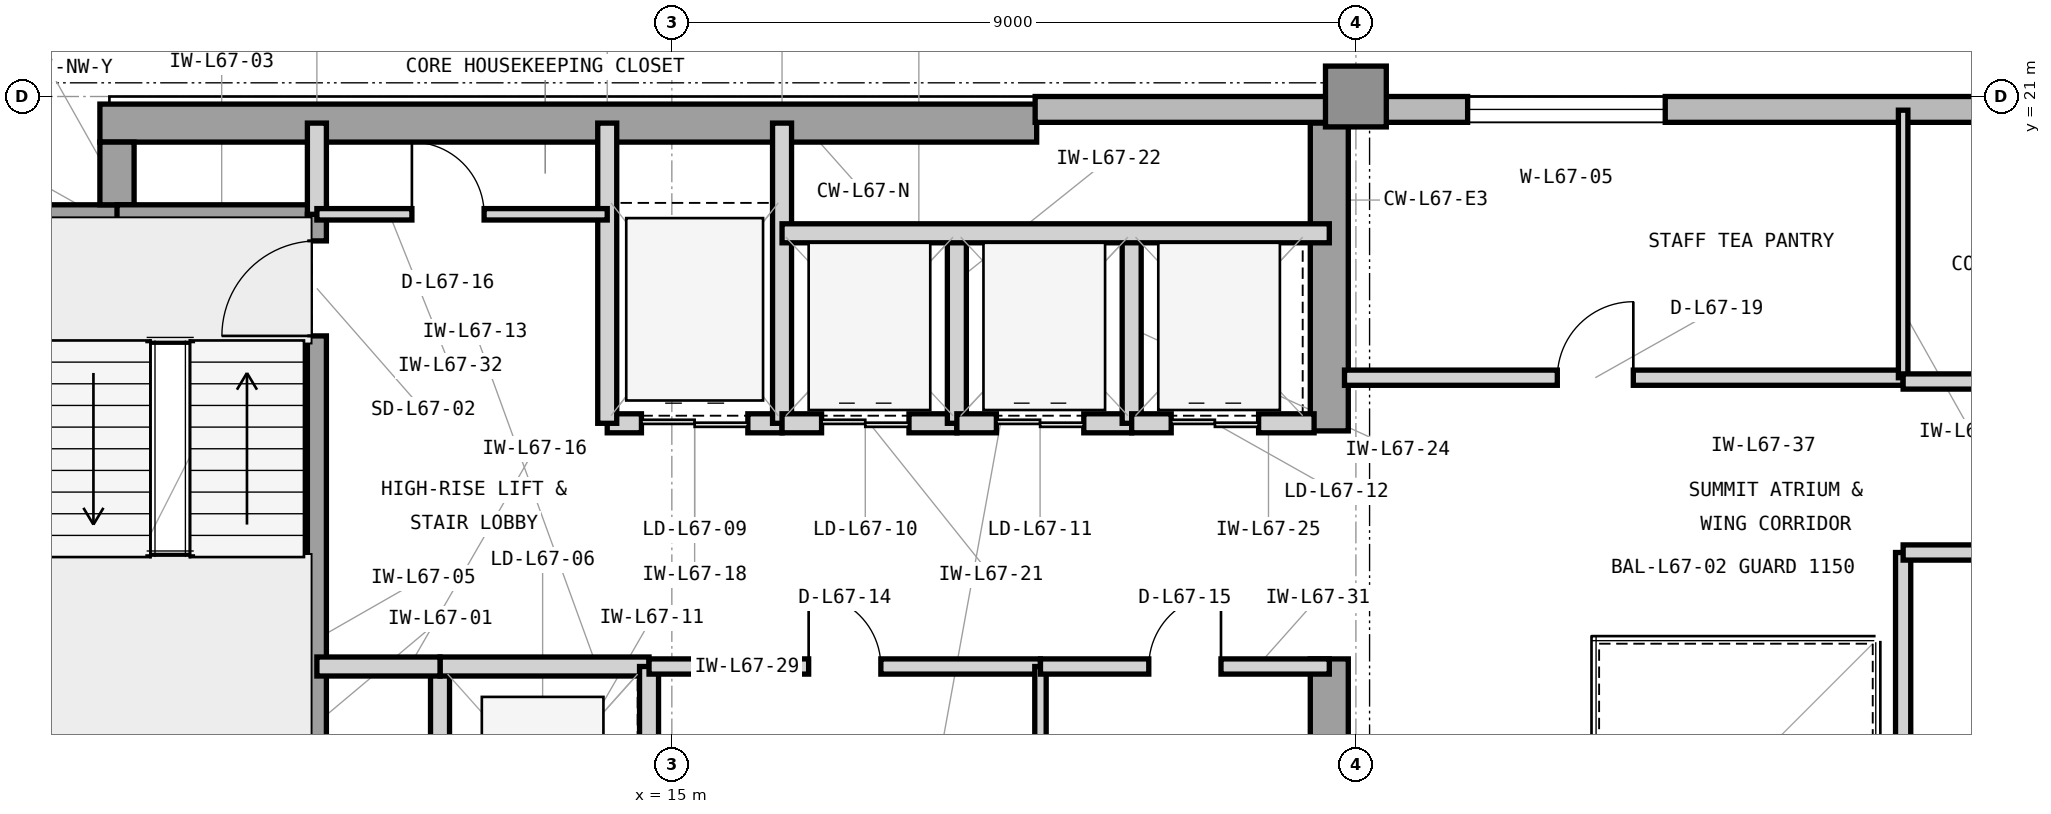
"""IFC4 building model, lengths in metres.
Left out: names, types, materials, properties, quantities, classifications, styles, units other than length and angle.
Written with IfcOpenShell. Run it as: python <this file> out.ifc"""

import sys

from ifc_helpers import new_model, si_unit, direction, frame, frame_2d, origin, origin_2d, place, context, subcontext, project, spatial, rectangle, extrude, element, fill, save


model = new_model("IFC4")
c1 = context("Model", 3, precision=1e-05, world=origin(), true_north=direction((0.0, 1.0)))
c2 = subcontext(c1, "Body", "Model", "MODEL_VIEW")
j1 = project(units=[si_unit("LENGTHUNIT", "METRE"), si_unit("PLANEANGLEUNIT", "RADIAN")], contexts=[c1])
p1 = place(None, origin())
s1 = spatial("IfcSite", under=j1, at=p1, CompositionType="ELEMENT")
p2 = place(p1, origin())
s2 = spatial("IfcBuilding", under=s1, at=p2, CompositionType="ELEMENT")
p3 = place(p2, frame((0.0, 0.0, 274.2)))
s3 = spatial("IfcBuildingStorey", under=s2, at=p3, CompositionType="ELEMENT", Elevation=274.2)
p4 = place(p3, frame((7.475, 20.65, 0.0), z_axis=(0.0, 0.0, 1.0), x_axis=(1.0, 0.0, 0.0)))
e1 = element("IfcWall", 1, at=p4, inside=s3, PredefinedType="SHEAR", context=c2, shape_type="SweptSolid", body=[
    extrude(rectangle(XDim=12.325, YDim=0.5, at=frame_2d((6.163, 0.0))), origin(), (0.0, 0.0, 1.0), 3.9),
])
p5 = place(p3, frame((23.65, 10.4, 0.0), z_axis=(0.0, 0.0, 1.0), x_axis=(0.0, 1.0, 0.0)))
e2 = element("IfcWall", 2, at=p5, inside=s3, PredefinedType="SHEAR", context=c2, shape_type="SweptSolid", body=[
    extrude(rectangle(XDim=3.2, YDim=0.5, at=frame_2d((1.6, 0.0))), origin(), (0.0, 0.0, 1.0), 3.9),
])
p6 = place(p3, frame((23.65, 16.6, 0.0), z_axis=(0.0, 0.0, 1.0), x_axis=(0.0, 1.0, 0.0)))
e3 = element("IfcWall", 3, at=p6, inside=s3, PredefinedType="SHEAR", context=c2, shape_type="SweptSolid", body=[
    extrude(rectangle(XDim=4.05, YDim=0.5, at=frame_2d((2.025, 0.0))), origin(), (0.0, 0.0, 1.0), 3.9),
])
p7 = place(p3, frame((6.6, 19.35, 0.0), z_axis=(0.0, 0.0, 1.0), x_axis=(1.0, 0.0, 0.0)))
e4 = element("IfcWall", 4, at=p7, inside=s3, PredefinedType="SHEAR", context=c2, shape_type="SweptSolid", body=[
    extrude(rectangle(XDim=1.325, YDim=0.45, at=frame_2d((0.663, 0.0))), origin(), (0.0, 0.0, 1.0), 3.9),
])
p8 = place(p3, frame((7.7, 19.575, 0.0), z_axis=(0.0, 0.0, 1.0), x_axis=(0.0, 1.0, 0.0)))
e5 = element("IfcWall", 5, at=p8, inside=s3, PredefinedType="SHEAR", context=c2, shape_type="SweptSolid", body=[
    extrude(rectangle(XDim=0.825, YDim=0.45, at=frame_2d((0.413, 0.0))), origin(), (0.0, 0.0, 1.0), 3.9),
])
p9 = place(p3, frame((24.0, 21.0, 0.0), z_axis=(0.0, 0.0, 1.0), x_axis=(1.0, 0.0, 0.0)))
e6 = element("IfcColumn", 6, at=p9, inside=s3, PredefinedType="COLUMN", context=c2, shape_type="SweptSolid", body=[
    extrude(rectangle(XDim=0.8, YDim=0.8, at=origin_2d()), origin(), (0.0, 0.0, 1.0), 3.9),
])
p10 = place(p3, frame((52.4, 20.83, 0.0), z_axis=(0.0, 0.0, 1.0), x_axis=(-1.0, 0.0, 0.0)))
e7 = element("IfcWall", 7, at=p10, inside=s3, PredefinedType="STANDARD", context=c2, shape_type="SweptSolid", body=[
    extrude(rectangle(XDim=32.62, YDim=0.34, at=frame_2d((16.31, 0.0))), origin(), (0.0, 0.0, 1.0), 3.715),
])
p11 = place(p10, frame((15.01, 0.0, 0.8)))
e8 = element("IfcOpeningElement", 8, at=p11, cuts=e7, PredefinedType="OPENING", context=c2, shape_type="SweptSolid", body=[
    extrude(rectangle(XDim=2.6, YDim=2.35, at=frame_2d((1.3, 1.175))), frame((0.0, 0.18, 0.0), z_axis=(0.0, -1.0, 0.0), x_axis=(1.0, 0.0, 0.0)), (0.0, 0.0, 1.0), 0.36),
])
p12 = place(p10, frame((24.33, 0.0, 0.8)))
e9 = element("IfcOpeningElement", 9, at=p12, cuts=e7, PredefinedType="OPENING", context=c2, shape_type="SweptSolid", body=[
    extrude(rectangle(XDim=2.6, YDim=2.35, at=frame_2d((1.3, 1.175))), frame((0.0, 0.18, 0.0), z_axis=(0.0, -1.0, 0.0), x_axis=(1.0, 0.0, 0.0)), (0.0, 0.0, 1.0), 0.36),
])
p13 = place(p10, frame((7.525, 0.0, 0.8)))
e10 = element("IfcOpeningElement", 10, at=p13, cuts=e7, PredefinedType="OPENING", context=c2, shape_type="SweptSolid", body=[
    extrude(rectangle(XDim=1.9, YDim=2.35, at=frame_2d((0.95, 1.175))), frame((0.0, 0.18, 0.0), z_axis=(0.0, -1.0, 0.0), x_axis=(1.0, 0.0, 0.0)), (0.0, 0.0, 1.0), 0.36),
])
p14 = place(p3, frame((7.7, 19.45, 0.0), z_axis=(0.0, 0.0, 1.0), x_axis=(1.0, 0.0, 0.0)))
e11 = element("IfcWall", 11, at=p14, inside=s3, PredefinedType="SHEAR", context=c2, shape_type="SweptSolid", body=[
    extrude(rectangle(XDim=2.755, YDim=0.25, at=frame_2d((1.377, 0.0))), origin(), (0.0, 0.0, 1.0), 3.9),
])
p15 = place(p3, frame((10.33, 12.0, 0.0), z_axis=(0.0, 0.0, 1.0), x_axis=(0.0, 1.0, 0.0)))
e12 = element("IfcWall", 12, at=p15, inside=s3, PredefinedType="SHEAR", context=c2, shape_type="SweptSolid", body=[
    extrude(rectangle(XDim=7.45, YDim=0.25, at=frame_2d((3.725, 0.0))), origin(), (0.0, 0.0, 1.0), 3.9),
])
p16 = place(p15, frame((5.85, 0.0, 0.0)))
e13 = element("IfcOpeningElement", 13, at=p16, cuts=e12, PredefinedType="OPENING", context=c2, shape_type="SweptSolid", body=[
    extrude(rectangle(XDim=1.25, YDim=2.2, at=frame_2d((0.625, 1.1))), frame((0.0, 0.135, 0.0), z_axis=(0.0, -1.0, 0.0), x_axis=(1.0, 0.0, 0.0)), (0.0, 0.0, 1.0), 0.27),
])
p17 = place(p3, frame((10.33, 19.45, 0.0), z_axis=(0.0, 0.0, 1.0), x_axis=(0.0, 1.0, 0.0)))
e14 = element("IfcWall", 14, at=p17, inside=s3, PredefinedType="PARTITIONING", context=c2, shape_type="SweptSolid", body=[
    extrude(rectangle(XDim=1.2, YDim=0.25, at=frame_2d((0.6, 0.0))), origin(), (0.0, 0.0, 1.0), 3.705),
])
p18 = place(p3, frame((11.95, 10.5, 0.0), z_axis=(0.0, 0.0, 1.0), x_axis=(0.0, 1.0, 0.0)))
e15 = element("IfcWall", 15, at=p18, inside=s3, PredefinedType="PARTITIONING", context=c2, shape_type="SweptSolid", body=[
    extrude(rectangle(XDim=3.0, YDim=0.25, at=frame_2d((1.5, 0.0))), origin(), (0.0, 0.0, 1.0), 3.705),
])
p19 = place(p3, frame((11.95, 13.5, 0.0), z_axis=(0.0, 0.0, 1.0), x_axis=(1.0, 0.0, 0.0)))
e16 = element("IfcWall", 16, at=p19, inside=s3, PredefinedType="PARTITIONING", context=c2, shape_type="SweptSolid", body=[
    extrude(rectangle(XDim=2.75, YDim=0.25, at=frame_2d((1.375, 0.0))), origin(), (0.0, 0.0, 1.0), 3.088),
])
p20 = place(p3, frame((14.7, 10.5, 0.0), z_axis=(0.0, 0.0, 1.0), x_axis=(0.0, 1.0, 0.0)))
e17 = element("IfcWall", 17, at=p20, inside=s3, PredefinedType="PARTITIONING", context=c2, shape_type="SweptSolid", body=[
    extrude(rectangle(XDim=3.0, YDim=0.25, at=frame_2d((1.5, 0.0))), origin(), (0.0, 0.0, 1.0), 3.705),
])
p21 = place(p3, frame((10.33, 13.5, 0.0), z_axis=(0.0, 0.0, 1.0), x_axis=(1.0, 0.0, 0.0)))
e18 = element("IfcWall", 18, at=p21, inside=s3, PredefinedType="PARTITIONING", context=c2, shape_type="SweptSolid", body=[
    extrude(rectangle(XDim=1.62, YDim=0.25, at=frame_2d((0.81, 0.0))), origin(), (0.0, 0.0, 1.0), 3.088),
])
p22 = place(p3, frame((14.15, 16.7, 0.0), z_axis=(0.0, 0.0, 1.0), x_axis=(1.0, 0.0, 0.0)))
e19 = element("IfcWall", 19, at=p22, inside=s3, PredefinedType="PARTITIONING", context=c2, shape_type="SweptSolid", body=[
    extrude(rectangle(XDim=2.3, YDim=0.25, at=frame_2d((1.15, 0.0))), origin(), (0.0, 0.0, 1.0), 3.088),
])
p23 = place(p22, frame((0.45, 0.0, 0.0)))
e20 = element("IfcOpeningElement", 20, at=p23, cuts=e19, PredefinedType="OPENING", context=c2, shape_type="SweptSolid", body=[
    extrude(rectangle(XDim=1.4, YDim=2.35, at=frame_2d((0.7, 1.175))), frame((0.0, 0.135, 0.0), z_axis=(0.0, -1.0, 0.0), x_axis=(1.0, 0.0, 0.0)), (0.0, 0.0, 1.0), 0.27),
])
for number, where, z_axis, x_axis in (
    (21, (14.15, 16.7, 0.0), (0.0, 0.0, 1.0), (0.0, 1.0, 0.0)),
    (22, (16.45, 16.7, 0.0), (0.0, 0.0, 1.0), (0.0, 1.0, 0.0)),
):
    element("IfcWall", number, at=place(p3, frame(where, z_axis=z_axis, x_axis=x_axis)), inside=s3, PredefinedType="PARTITIONING", context=c2, shape_type="SweptSolid", body=[
        extrude(rectangle(XDim=3.95, YDim=0.25, at=frame_2d((1.975, 0.0))), origin(), (0.0, 0.0, 1.0), 3.705),
    ])
p24 = place(p3, frame((16.45, 16.7, 0.0), z_axis=(0.0, 0.0, 1.0), x_axis=(1.0, 0.0, 0.0)))
e23 = element("IfcWall", 23, at=p24, inside=s3, PredefinedType="PARTITIONING", context=c2, shape_type="SweptSolid", body=[
    extrude(rectangle(XDim=2.3, YDim=0.25, at=frame_2d((1.15, 0.0))), origin(), (0.0, 0.0, 1.0), 3.088),
])
p25 = place(p24, frame((0.52, 0.0, 0.0)))
e24 = element("IfcOpeningElement", 24, at=p25, cuts=e23, PredefinedType="OPENING", context=c2, shape_type="SweptSolid", body=[
    extrude(rectangle(XDim=1.15, YDim=2.25, at=frame_2d((0.575, 1.125))), frame((0.0, 0.135, 0.0), z_axis=(0.0, -1.0, 0.0), x_axis=(1.0, 0.0, 0.0)), (0.0, 0.0, 1.0), 0.27),
])
p26 = place(p3, frame((18.75, 16.7, 0.0), z_axis=(0.0, 0.0, 1.0), x_axis=(0.0, 1.0, 0.0)))
e25 = element("IfcWall", 25, at=p26, inside=s3, PredefinedType="PARTITIONING", context=c2, shape_type="SweptSolid", body=[
    extrude(rectangle(XDim=2.5, YDim=0.25, at=frame_2d((1.25, 0.0))), origin(), (0.0, 0.0, 1.0), 3.705),
])
p27 = place(p3, frame((18.75, 16.7, 0.0), z_axis=(0.0, 0.0, 1.0), x_axis=(1.0, 0.0, 0.0)))
e26 = element("IfcWall", 26, at=p27, inside=s3, PredefinedType="PARTITIONING", context=c2, shape_type="SweptSolid", body=[
    extrude(rectangle(XDim=2.3, YDim=0.25, at=frame_2d((1.15, 0.0))), origin(), (0.0, 0.0, 1.0), 3.088),
])
p28 = place(p27, frame((0.52, 0.0, 0.0)))
e27 = element("IfcOpeningElement", 27, at=p28, cuts=e26, PredefinedType="OPENING", context=c2, shape_type="SweptSolid", body=[
    extrude(rectangle(XDim=1.15, YDim=2.25, at=frame_2d((0.575, 1.125))), frame((0.0, 0.135, 0.0), z_axis=(0.0, -1.0, 0.0), x_axis=(1.0, 0.0, 0.0)), (0.0, 0.0, 1.0), 0.27),
])
p29 = place(p3, frame((21.05, 16.7, 0.0), z_axis=(0.0, 0.0, 1.0), x_axis=(0.0, 1.0, 0.0)))
e28 = element("IfcWall", 28, at=p29, inside=s3, PredefinedType="PARTITIONING", context=c2, shape_type="SweptSolid", body=[
    extrude(rectangle(XDim=2.5, YDim=0.25, at=frame_2d((1.25, 0.0))), origin(), (0.0, 0.0, 1.0), 3.705),
])
p30 = place(p3, frame((21.05, 16.7, 0.0), z_axis=(0.0, 0.0, 1.0), x_axis=(1.0, 0.0, 0.0)))
e29 = element("IfcWall", 29, at=p30, inside=s3, PredefinedType="PARTITIONING", context=c2, shape_type="SweptSolid", body=[
    extrude(rectangle(XDim=2.4, YDim=0.25, at=frame_2d((1.2, 0.0))), origin(), (0.0, 0.0, 1.0), 3.088),
])
p31 = place(p30, frame((0.52, 0.0, 0.0)))
e30 = element("IfcOpeningElement", 30, at=p31, cuts=e29, PredefinedType="OPENING", context=c2, shape_type="SweptSolid", body=[
    extrude(rectangle(XDim=1.15, YDim=2.25, at=frame_2d((0.575, 1.125))), frame((0.0, 0.135, 0.0), z_axis=(0.0, -1.0, 0.0), x_axis=(1.0, 0.0, 0.0)), (0.0, 0.0, 1.0), 0.27),
])
p32 = place(p3, frame((16.45, 19.2, 0.0), z_axis=(0.0, 0.0, 1.0), x_axis=(1.0, 0.0, 0.0)))
e31 = element("IfcWall", 31, at=p32, inside=s3, PredefinedType="PARTITIONING", context=c2, shape_type="SweptSolid", body=[
    extrude(rectangle(XDim=7.2, YDim=0.25, at=frame_2d((3.6, 0.0))), origin(), (0.0, 0.0, 1.0), 3.705),
])
p33 = place(p3, frame((14.7, 13.5, 0.0), z_axis=(0.0, 0.0, 1.0), x_axis=(1.0, 0.0, 0.0)))
e32 = element("IfcWall", 32, at=p33, inside=s3, PredefinedType="PARTITIONING", context=c2, shape_type="SweptSolid", body=[
    extrude(rectangle(XDim=5.15, YDim=0.2, at=frame_2d((2.575, 0.0))), origin(), (0.0, 0.0, 1.0), 3.088),
])
p34 = place(p33, frame((2.1, 0.0, 0.0)))
e33 = element("IfcOpeningElement", 33, at=p34, cuts=e32, PredefinedType="OPENING", context=c2, shape_type="SweptSolid", body=[
    extrude(rectangle(XDim=0.95, YDim=2.1, at=frame_2d((0.475, 1.05))), frame((0.0, 0.11, 0.0), z_axis=(0.0, -1.0, 0.0), x_axis=(1.0, 0.0, 0.0)), (0.0, 0.0, 1.0), 0.22),
])
p35 = place(p3, frame((19.85, 10.465, 0.0), z_axis=(0.0, 0.0, 1.0), x_axis=(0.0, 1.0, 0.0)))
e34 = element("IfcWall", 34, at=p35, inside=s3, PredefinedType="PARTITIONING", context=c2, shape_type="SweptSolid", body=[
    extrude(rectangle(XDim=3.035, YDim=0.15, at=frame_2d((1.518, 0.0))), origin(), (0.0, 0.0, 1.0), 3.705),
])
p36 = place(p3, frame((19.85, 13.5, 0.0), z_axis=(0.0, 0.0, 1.0), x_axis=(1.0, 0.0, 0.0)))
e35 = element("IfcWall", 35, at=p36, inside=s3, PredefinedType="PARTITIONING", context=c2, shape_type="SweptSolid", body=[
    extrude(rectangle(XDim=3.8, YDim=0.2, at=frame_2d((1.9, 0.0))), origin(), (0.0, 0.0, 1.0), 3.088),
])
p37 = place(p36, frame((1.425, 0.0, 0.0)))
e36 = element("IfcOpeningElement", 36, at=p37, cuts=e35, PredefinedType="OPENING", context=c2, shape_type="SweptSolid", body=[
    extrude(rectangle(XDim=0.95, YDim=2.1, at=frame_2d((0.475, 1.05))), frame((0.0, 0.11, 0.0), z_axis=(0.0, -1.0, 0.0), x_axis=(1.0, 0.0, 0.0)), (0.0, 0.0, 1.0), 0.22),
])
p38 = place(p3, frame((10.33, 19.45, 0.0), z_axis=(0.0, 0.0, 1.0), x_axis=(1.0, 0.0, 0.0)))
e37 = element("IfcWall", 37, at=p38, inside=s3, PredefinedType="PARTITIONING", context=c2, shape_type="SweptSolid", body=[
    extrude(rectangle(XDim=3.82, YDim=0.15, at=frame_2d((1.91, 0.0))), origin(), (0.0, 0.0, 1.0), 3.705),
])
p39 = place(p38, frame((1.25, 0.0, 0.0)))
e38 = element("IfcOpeningElement", 38, at=p39, cuts=e37, PredefinedType="OPENING", context=c2, shape_type="SweptSolid", body=[
    extrude(rectangle(XDim=0.95, YDim=2.1, at=frame_2d((0.475, 1.05))), frame((0.0, 0.085, 0.0), z_axis=(0.0, -1.0, 0.0), x_axis=(1.0, 0.0, 0.0)), (0.0, 0.0, 1.0), 0.17),
])
p40 = place(p3, frame((31.2, 3.18, 0.0), z_axis=(0.0, 0.0, 1.0), x_axis=(0.0, 1.0, 0.0)))
e39 = element("IfcWall", 39, at=p40, inside=s3, PredefinedType="PARTITIONING", context=c2, shape_type="SweptSolid", body=[
    extrude(rectangle(XDim=11.82, YDim=0.2, at=frame_2d((5.91, 0.0))), origin(), (0.0, 0.0, 1.0), 3.705),
])
p41 = place(p3, frame((23.85, 17.3, 0.0), z_axis=(0.0, 0.0, 1.0), x_axis=(1.0, 0.0, 0.0)))
e40 = element("IfcWall", 40, at=p41, inside=s3, PredefinedType="PARTITIONING", context=c2, shape_type="SweptSolid", body=[
    extrude(rectangle(XDim=7.35, YDim=0.2, at=frame_2d((3.675, 0.0))), origin(), (0.0, 0.0, 1.0), 3.705),
])
p42 = place(p41, frame((2.8, 0.0, 0.0)))
e41 = element("IfcOpeningElement", 41, at=p42, cuts=e40, PredefinedType="OPENING", context=c2, shape_type="SweptSolid", body=[
    extrude(rectangle(XDim=1.0, YDim=2.15, at=frame_2d((0.5, 1.075))), frame((0.0, 0.11, 0.0), z_axis=(0.0, -1.0, 0.0), x_axis=(1.0, 0.0, 0.0)), (0.0, 0.0, 1.0), 0.22),
])
p43 = place(p3, frame((31.2, 17.3, 0.0), z_axis=(0.0, 0.0, 1.0), x_axis=(0.0, 1.0, 0.0)))
e42 = element("IfcWall", 42, at=p43, inside=s3, PredefinedType="PARTITIONING", context=c2, shape_type="SweptSolid", body=[
    extrude(rectangle(XDim=3.52, YDim=0.125, at=frame_2d((1.76, 0.0))), origin(), (0.0, 0.0, 1.0), 3.705),
])
p44 = place(p3, frame((31.2, 15.0, 0.0), z_axis=(0.0, 0.0, 1.0), x_axis=(1.0, 0.0, 0.0)))
e43 = element("IfcWall", 43, at=p44, inside=s3, PredefinedType="PARTITIONING", context=c2, shape_type="SweptSolid", body=[
    extrude(rectangle(XDim=6.5, YDim=0.2, at=frame_2d((3.25, 0.0))), origin(), (0.0, 0.0, 1.0), 3.301),
])
p45 = place(p44, frame((2.5, 0.0, 0.0)))
e44 = element("IfcOpeningElement", 44, at=p45, cuts=e43, PredefinedType="OPENING", context=c2, shape_type="SweptSolid", body=[
    extrude(rectangle(XDim=1.5, YDim=2.3, at=frame_2d((0.75, 1.15))), frame((0.0, 0.11, 0.0), z_axis=(0.0, -1.0, 0.0), x_axis=(1.0, 0.0, 0.0)), (0.0, 0.0, 1.0), 0.22),
])
p46 = place(p3, frame((31.2, 17.25, 0.0), z_axis=(0.0, 0.0, 1.0), x_axis=(1.0, 0.0, 0.0)))
e45 = element("IfcWall", 45, at=p46, inside=s3, PredefinedType="PARTITIONING", context=c2, shape_type="SweptSolid", body=[
    extrude(rectangle(XDim=9.0, YDim=0.2, at=frame_2d((4.5, 0.0))), origin(), (0.0, 0.0, 1.0), 3.705),
])
p47 = place(p46, frame((3.75, 0.0, 0.0)))
e46 = element("IfcOpeningElement", 46, at=p47, cuts=e45, PredefinedType="OPENING", context=c2, shape_type="SweptSolid", body=[
    extrude(rectangle(XDim=1.5, YDim=2.3, at=frame_2d((0.75, 1.15))), frame((0.0, 0.11, 0.0), z_axis=(0.0, -1.0, 0.0), x_axis=(1.0, 0.0, 0.0)), (0.0, 0.0, 1.0), 0.22),
])
p48 = place(p12, origin())
e47 = element("IfcWindow", 47, at=p48, inside=s3, PartitioningType="SINGLE_PANEL", PredefinedType="WINDOW", context=c2, shape_type="SweptSolid", body=[
    extrude(rectangle(XDim=2.6, YDim=2.35, at=frame_2d((1.3, 1.175))), frame((0.0, 0.11, 0.0), z_axis=(0.0, -1.0, 0.0), x_axis=(1.0, 0.0, 0.0)), (0.0, 0.0, 1.0), 0.06),
])
fill(e9, e47)
p49 = place(p16, origin())
e48 = element("IfcDoor", 48, at=p49, inside=s3, OperationType="SINGLE_SWING_LEFT", PredefinedType="DOOR", context=c2, shape_type="SweptSolid", body=[
    extrude(rectangle(XDim=1.25, YDim=2.2, at=frame_2d((0.625, 1.1))), frame((0.0, 0.025, 0.0), z_axis=(0.0, -1.0, 0.0), x_axis=(1.0, 0.0, 0.0)), (0.0, 0.0, 1.0), 0.05),
])
fill(e13, e48)
p50 = place(p23, origin())
e49 = element("IfcDoor", 49, at=p50, inside=s3, OperationType="DOUBLE_DOOR_SLIDING", PredefinedType="DOOR", context=c2, shape_type="SweptSolid", body=[
    extrude(rectangle(XDim=1.4, YDim=2.35, at=frame_2d((0.7, 1.175))), frame((0.0, 0.025, 0.0), z_axis=(0.0, -1.0, 0.0), x_axis=(1.0, 0.0, 0.0)), (0.0, 0.0, 1.0), 0.05),
])
fill(e20, e49)
p51 = place(p25, origin())
e50 = element("IfcDoor", 50, at=p51, inside=s3, OperationType="DOUBLE_DOOR_SLIDING", PredefinedType="DOOR", context=c2, shape_type="SweptSolid", body=[
    extrude(rectangle(XDim=1.15, YDim=2.25, at=frame_2d((0.575, 1.125))), frame((0.0, 0.025, 0.0), z_axis=(0.0, -1.0, 0.0), x_axis=(1.0, 0.0, 0.0)), (0.0, 0.0, 1.0), 0.05),
])
fill(e24, e50)
p52 = place(p28, origin())
e51 = element("IfcDoor", 51, at=p52, inside=s3, OperationType="DOUBLE_DOOR_SLIDING", PredefinedType="DOOR", context=c2, shape_type="SweptSolid", body=[
    extrude(rectangle(XDim=1.15, YDim=2.25, at=frame_2d((0.575, 1.125))), frame((0.0, 0.025, 0.0), z_axis=(0.0, -1.0, 0.0), x_axis=(1.0, 0.0, 0.0)), (0.0, 0.0, 1.0), 0.05),
])
fill(e27, e51)
p53 = place(p31, origin())
e52 = element("IfcDoor", 52, at=p53, inside=s3, OperationType="DOUBLE_DOOR_SLIDING", PredefinedType="DOOR", context=c2, shape_type="SweptSolid", body=[
    extrude(rectangle(XDim=1.15, YDim=2.25, at=frame_2d((0.575, 1.125))), frame((0.0, 0.025, 0.0), z_axis=(0.0, -1.0, 0.0), x_axis=(1.0, 0.0, 0.0)), (0.0, 0.0, 1.0), 0.05),
])
fill(e30, e52)
p54 = place(p34, origin())
e53 = element("IfcDoor", 53, at=p54, inside=s3, OperationType="SINGLE_SWING_LEFT", PredefinedType="DOOR", context=c2, shape_type="SweptSolid", body=[
    extrude(rectangle(XDim=0.95, YDim=2.1, at=frame_2d((0.475, 1.05))), frame((0.0, 0.025, 0.0), z_axis=(0.0, -1.0, 0.0), x_axis=(1.0, 0.0, 0.0)), (0.0, 0.0, 1.0), 0.05),
])
fill(e33, e53)
p55 = place(p37, origin())
e54 = element("IfcDoor", 54, at=p55, inside=s3, OperationType="SINGLE_SWING_RIGHT", PredefinedType="DOOR", context=c2, shape_type="SweptSolid", body=[
    extrude(rectangle(XDim=0.95, YDim=2.1, at=frame_2d((0.475, 1.05))), frame((0.0, 0.025, 0.0), z_axis=(0.0, -1.0, 0.0), x_axis=(1.0, 0.0, 0.0)), (0.0, 0.0, 1.0), 0.05),
])
fill(e36, e54)
p56 = place(p39, origin())
e55 = element("IfcDoor", 55, at=p56, inside=s3, OperationType="SINGLE_SWING_LEFT", PredefinedType="DOOR", context=c2, shape_type="SweptSolid", body=[
    extrude(rectangle(XDim=0.95, YDim=2.1, at=frame_2d((0.475, 1.05))), frame((0.0, 0.025, 0.0), z_axis=(0.0, -1.0, 0.0), x_axis=(1.0, 0.0, 0.0)), (0.0, 0.0, 1.0), 0.05),
])
fill(e38, e55)
p57 = place(p42, origin())
e56 = element("IfcDoor", 56, at=p57, inside=s3, OperationType="SINGLE_SWING_RIGHT", PredefinedType="DOOR", context=c2, shape_type="SweptSolid", body=[
    extrude(rectangle(XDim=1.0, YDim=2.15, at=frame_2d((0.5, 1.075))), frame((0.0, 0.025, 0.0), z_axis=(0.0, -1.0, 0.0), x_axis=(1.0, 0.0, 0.0)), (0.0, 0.0, 1.0), 0.05),
])
fill(e41, e56)
save(model, sys.argv[1])
